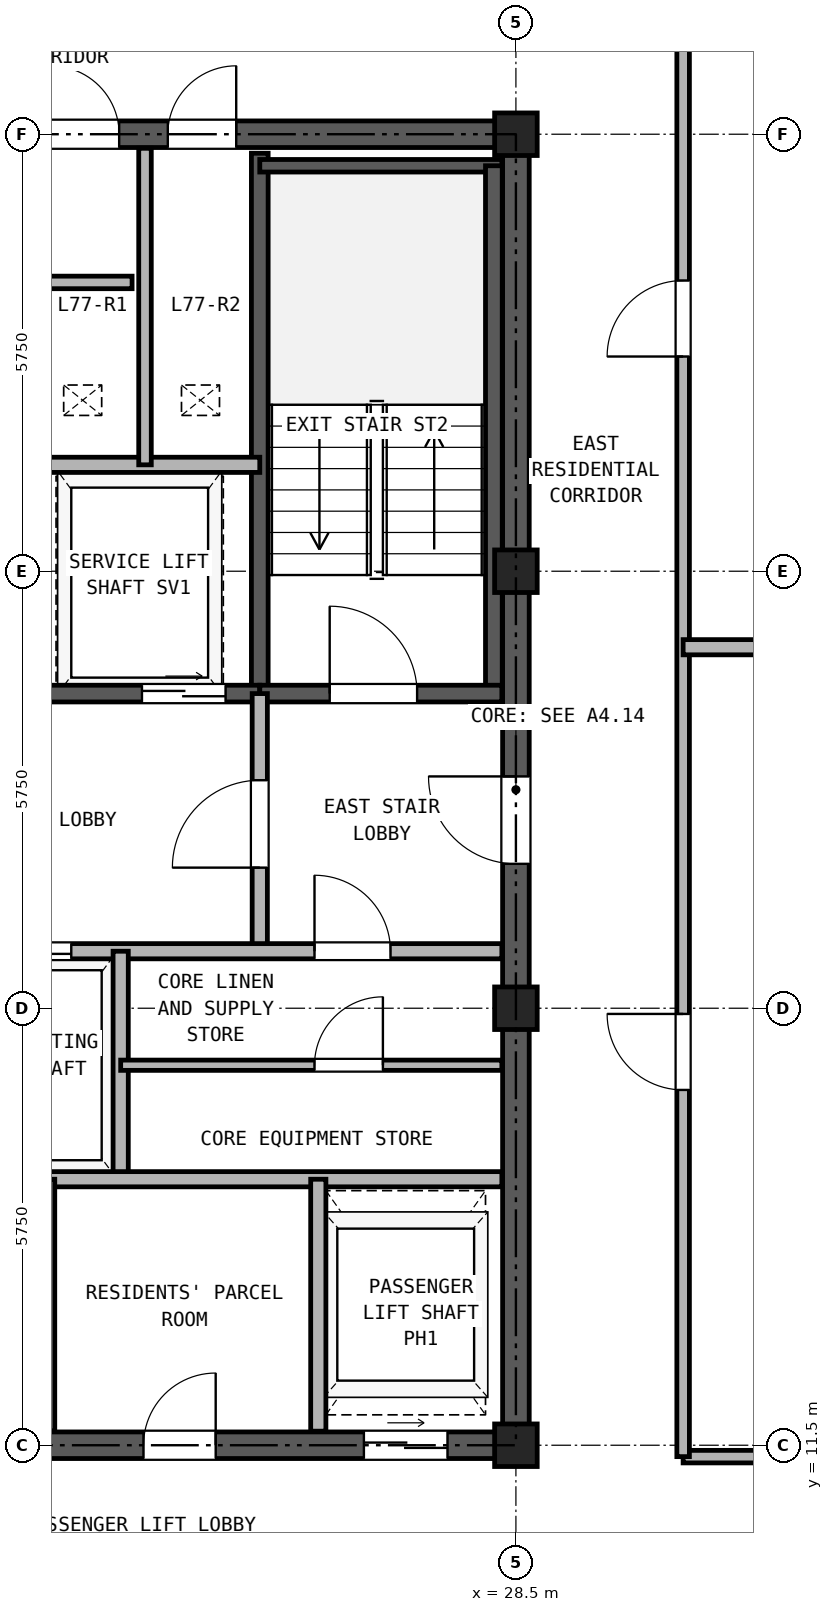
"""IFC4 building model, lengths in metres.
Left out: names, types, materials, properties, quantities, classifications, styles, units other than length and angle.
Written with IfcOpenShell. Run it as: python <this file> out.ifc"""

import sys

from ifc_helpers import new_model, si_unit, direction, frame, frame_2d, origin, origin_2d, place, context, subcontext, project, spatial, rectangle, hollow_rectangle, extrude, source, transform, mapped, element, fill, save


model = new_model("IFC4")
c1 = context("Model", 3, precision=1e-05, world=origin(), true_north=direction((0.0, 1.0)))
c2 = subcontext(c1, "Body", "Model", "MODEL_VIEW")
j1 = project(units=[si_unit("LENGTHUNIT", "METRE"), si_unit("PLANEANGLEUNIT", "RADIAN")], contexts=[c1])
p1 = place(None, origin())
s1 = spatial("IfcSite", under=j1, at=p1, CompositionType="ELEMENT")
p2 = place(p1, origin())
s2 = spatial("IfcBuilding", under=s1, at=p2, CompositionType="ELEMENT")
p3 = place(p2, frame((0.0, 0.0, 268.1)))
s3 = spatial("IfcBuildingStorey", under=s2, at=p3, CompositionType="ELEMENT", Elevation=268.1)
m1 = source(origin(), c2, "Body", "SweptSolid", [
    extrude(hollow_rectangle(XDim=0.56, YDim=0.56, WallThickness=0.03, at=origin_2d()), origin(), (0.0, 0.0, 1.0), 2.98),
])
for number, where, z_axis, x_axis in (
    (1, (28.5, 11.5, 0.0), (0.0, 0.0, 1.0), (1.0, 0.0, 0.0)),
    (2, (28.5, 17.25, 0.0), (0.0, 0.0, 1.0), (1.0, 0.0, 0.0)),
    (3, (28.5, 23.0, 0.0), (0.0, 0.0, 1.0), (1.0, 0.0, 0.0)),
    (4, (28.5, 28.75, 0.0), (0.0, 0.0, 1.0), (1.0, 0.0, 0.0)),
):
    element("IfcColumn", number, at=place(p3, frame(where, z_axis=z_axis, x_axis=x_axis)), inside=s3, PredefinedType="COLUMN", context=c2, shape_type="MappedRepresentation", body=[
        mapped(m1, transform((0.0, 0.0, 0.0), x_axis=(1.0, 0.0, 0.0), y_axis=(0.0, 1.0, 0.0), z_axis=(0.0, 0.0, 1.0), scale=1.0)),
    ])
p4 = place(p3, frame((18.325, 11.5, 0.0), z_axis=(0.0, 0.0, 1.0), x_axis=(1.0, 0.0, 0.0)))
e5 = element("IfcWall", 5, at=p4, inside=s3, PredefinedType="SHEAR", context=c2, shape_type="SweptSolid", body=[
    extrude(rectangle(XDim=10.35, YDim=0.35, at=frame_2d((5.175, 0.0))), origin(), (0.0, 0.0, 1.0), 2.98),
])
p5 = place(p4, frame((1.775, 0.0, 0.0)))
e6 = element("IfcOpeningElement", 6, at=p5, cuts=e5, PredefinedType="OPENING", context=c2, shape_type="SweptSolid", body=[
    extrude(rectangle(XDim=0.95, YDim=2.15, at=frame_2d((0.475, 1.075))), frame((0.0, 0.185, 0.0), z_axis=(0.0, -1.0, 0.0), x_axis=(1.0, 0.0, 0.0)), (0.0, 0.0, 1.0), 0.37),
])
p6 = place(p4, frame((5.275, 0.0, 0.0)))
e7 = element("IfcOpeningElement", 7, at=p6, cuts=e5, PredefinedType="OPENING", context=c2, shape_type="SweptSolid", body=[
    extrude(rectangle(XDim=0.95, YDim=2.15, at=frame_2d((0.475, 1.075))), frame((0.0, 0.185, 0.0), z_axis=(0.0, -1.0, 0.0), x_axis=(1.0, 0.0, 0.0)), (0.0, 0.0, 1.0), 0.37),
])
p7 = place(p4, frame((8.175, 0.0, 0.0)))
e8 = element("IfcOpeningElement", 8, at=p7, cuts=e5, PredefinedType="OPENING", context=c2, shape_type="SweptSolid", body=[
    extrude(rectangle(XDim=1.1, YDim=2.25, at=frame_2d((0.55, 1.125))), frame((0.0, 0.185, 0.0), z_axis=(0.0, -1.0, 0.0), x_axis=(1.0, 0.0, 0.0)), (0.0, 0.0, 1.0), 0.37),
])
p8 = place(p3, frame((18.325, 28.75, 0.0), z_axis=(0.0, 0.0, 1.0), x_axis=(1.0, 0.0, 0.0)))
e9 = element("IfcWall", 9, at=p8, inside=s3, PredefinedType="SHEAR", context=c2, shape_type="SweptSolid", body=[
    extrude(rectangle(XDim=10.35, YDim=0.35, at=frame_2d((5.175, 0.0))), origin(), (0.0, 0.0, 1.0), 2.98),
])
p9 = place(p8, frame((4.055, 0.0, 0.0)))
e10 = element("IfcOpeningElement", 10, at=p9, cuts=e9, PredefinedType="OPENING", context=c2, shape_type="SweptSolid", body=[
    extrude(rectangle(XDim=0.9, YDim=2.05, at=frame_2d((0.45, 1.025))), frame((0.0, 0.185, 0.0), z_axis=(0.0, -1.0, 0.0), x_axis=(1.0, 0.0, 0.0)), (0.0, 0.0, 1.0), 0.37),
])
p10 = place(p8, frame((5.595, 0.0, 0.0)))
e11 = element("IfcOpeningElement", 11, at=p10, cuts=e9, PredefinedType="OPENING", context=c2, shape_type="SweptSolid", body=[
    extrude(rectangle(XDim=0.9, YDim=2.05, at=frame_2d((0.45, 1.025))), frame((0.0, 0.185, 0.0), z_axis=(0.0, -1.0, 0.0), x_axis=(1.0, 0.0, 0.0)), (0.0, 0.0, 1.0), 0.37),
])
p11 = place(p3, frame((28.5, 11.675, 0.0), z_axis=(0.0, 0.0, 1.0), x_axis=(0.0, 1.0, 0.0)))
e12 = element("IfcWall", 12, at=p11, inside=s3, PredefinedType="SHEAR", context=c2, shape_type="SweptSolid", body=[
    extrude(rectangle(XDim=16.9, YDim=0.35, at=frame_2d((8.45, 0.0))), origin(), (0.0, 0.0, 1.0), 2.98),
])
p12 = place(p11, frame((7.475, 0.0, 0.0)))
e13 = element("IfcOpeningElement", 13, at=p12, cuts=e12, PredefinedType="OPENING", context=c2, shape_type="SweptSolid", body=[
    extrude(rectangle(XDim=1.15, YDim=2.2, at=frame_2d((0.575, 1.1))), frame((0.0, 0.185, 0.0), z_axis=(0.0, -1.0, 0.0), x_axis=(1.0, 0.0, 0.0)), (0.0, 0.0, 1.0), 0.37),
])
p13 = place(p3, frame((25.13, 21.39, 0.0), z_axis=(0.0, 0.0, 1.0), x_axis=(0.0, 1.0, 0.0)))
e14 = element("IfcWall", 14, at=p13, inside=s3, PredefinedType="SOLIDWALL", context=c2, shape_type="SweptSolid", body=[
    extrude(rectangle(XDim=7.11, YDim=0.22, at=frame_2d((3.555, 0.0))), origin(), (0.0, 0.0, 1.0), 2.98),
])
p14 = place(p3, frame((25.13, 28.335, 0.0), z_axis=(0.0, 0.0, 1.0), x_axis=(1.0, 0.0, 0.0)))
e15 = element("IfcWall", 15, at=p14, inside=s3, PredefinedType="PARTITIONING", context=c2, shape_type="SweptSolid", body=[
    extrude(rectangle(XDim=3.185, YDim=0.165, at=frame_2d((1.593, 0.0))), origin(), (0.0, 0.0, 1.0), 2.98),
])
p15 = place(p3, frame((28.21, 21.39, 0.0), z_axis=(0.0, 0.0, 1.0), x_axis=(0.0, 1.0, 0.0)))
e16 = element("IfcWall", 16, at=p15, inside=s3, PredefinedType="SOLIDWALL", context=c2, shape_type="SweptSolid", body=[
    extrude(rectangle(XDim=6.945, YDim=0.22, at=frame_2d((3.473, 0.0))), origin(), (0.0, 0.0, 1.0), 2.98),
])
p16 = place(p3, frame((18.685, 21.39, 0.0), z_axis=(0.0, 0.0, 1.0), x_axis=(1.0, 0.0, 0.0)))
e17 = element("IfcWall", 17, at=p16, inside=s3, PredefinedType="SOLIDWALL", context=c2, shape_type="SweptSolid", body=[
    extrude(rectangle(XDim=6.445, YDim=0.22, at=frame_2d((3.222, 0.0))), origin(), (0.0, 0.0, 1.0), 2.98),
])
p17 = place(p16, frame((1.165, 0.0, 0.0)))
e18 = element("IfcOpeningElement", 18, at=p17, cuts=e17, PredefinedType="OPENING", context=c2, shape_type="SweptSolid", body=[
    extrude(rectangle(XDim=1.15, YDim=2.2, at=frame_2d((0.575, 1.1))), frame((0.0, 0.12, 0.0), z_axis=(0.0, -1.0, 0.0), x_axis=(1.0, 0.0, 0.0)), (0.0, 0.0, 1.0), 0.24),
])
p18 = place(p16, frame((4.895, 0.0, 0.0)))
e19 = element("IfcOpeningElement", 19, at=p18, cuts=e17, PredefinedType="OPENING", context=c2, shape_type="SweptSolid", body=[
    extrude(rectangle(XDim=1.1, YDim=2.25, at=frame_2d((0.55, 1.125))), frame((0.0, 0.12, 0.0), z_axis=(0.0, -1.0, 0.0), x_axis=(1.0, 0.0, 0.0)), (0.0, 0.0, 1.0), 0.24),
])
p19 = place(p3, frame((25.13, 21.39, 0.0), z_axis=(0.0, 0.0, 1.0), x_axis=(1.0, 0.0, 0.0)))
e20 = element("IfcWall", 20, at=p19, inside=s3, PredefinedType="SOLIDWALL", context=c2, shape_type="SweptSolid", body=[
    extrude(rectangle(XDim=3.185, YDim=0.22, at=frame_2d((1.593, 0.0))), origin(), (0.0, 0.0, 1.0), 2.98),
])
p20 = place(p19, frame((0.92, 0.0, 0.0)))
e21 = element("IfcOpeningElement", 21, at=p20, cuts=e20, PredefinedType="OPENING", context=c2, shape_type="SweptSolid", body=[
    extrude(rectangle(XDim=1.15, YDim=2.2, at=frame_2d((0.575, 1.1))), frame((0.0, 0.12, 0.0), z_axis=(0.0, -1.0, 0.0), x_axis=(1.0, 0.0, 0.0)), (0.0, 0.0, 1.0), 0.24),
])
p21 = place(p3, frame((22.11, 24.4, 0.0), z_axis=(0.0, 0.0, 1.0), x_axis=(1.0, 0.0, 0.0)))
e22 = element("IfcWall", 22, at=p21, inside=s3, PredefinedType="PARTITIONING", context=c2, shape_type="SweptSolid", body=[
    extrude(rectangle(XDim=3.02, YDim=0.2, at=frame_2d((1.51, 0.0))), origin(), (0.0, 0.0, 1.0), 2.98),
])
p22 = place(p3, frame((23.62, 24.4, 0.0), z_axis=(0.0, 0.0, 1.0), x_axis=(0.0, 1.0, 0.0)))
e23 = element("IfcWall", 23, at=p22, inside=s3, PredefinedType="PARTITIONING", context=c2, shape_type="SweptSolid", body=[
    extrude(rectangle(XDim=4.165, YDim=0.165, at=frame_2d((2.083, 0.0))), origin(), (0.0, 0.0, 1.0), 2.98),
])
p23 = place(p3, frame((25.13, 18.0, 0.0), z_axis=(0.0, 0.0, 1.0), x_axis=(0.0, 1.0, 0.0)))
e24 = element("IfcWall", 24, at=p23, inside=s3, PredefinedType="PARTITIONING", context=c2, shape_type="SweptSolid", body=[
    extrude(rectangle(XDim=3.39, YDim=0.2, at=frame_2d((1.695, 0.0))), origin(), (0.0, 0.0, 1.0), 2.98),
])
p24 = place(p23, frame((1.1, 0.0, 0.0)))
e25 = element("IfcOpeningElement", 25, at=p24, cuts=e24, PredefinedType="OPENING", context=c2, shape_type="SweptSolid", body=[
    extrude(rectangle(XDim=1.15, YDim=2.2, at=frame_2d((0.575, 1.1))), frame((0.0, 0.11, 0.0), z_axis=(0.0, -1.0, 0.0), x_axis=(1.0, 0.0, 0.0)), (0.0, 0.0, 1.0), 0.22),
])
p25 = place(p3, frame((18.685, 18.0, 0.0), z_axis=(0.0, 0.0, 1.0), x_axis=(1.0, 0.0, 0.0)))
e26 = element("IfcWall", 26, at=p25, inside=s3, PredefinedType="PARTITIONING", context=c2, shape_type="SweptSolid", body=[
    extrude(rectangle(XDim=9.63, YDim=0.2, at=frame_2d((4.815, 0.0))), origin(), (0.0, 0.0, 1.0), 2.98),
])
p26 = place(p25, frame((0.565, 0.0, 0.0)))
e27 = element("IfcOpeningElement", 27, at=p26, cuts=e26, PredefinedType="OPENING", context=c2, shape_type="SweptSolid", body=[
    extrude(rectangle(XDim=1.3, YDim=2.3, at=frame_2d((0.65, 1.15))), frame((0.0, 0.11, 0.0), z_axis=(0.0, -1.0, 0.0), x_axis=(1.0, 0.0, 0.0)), (0.0, 0.0, 1.0), 0.22),
])
p27 = place(p25, frame((2.665, 0.0, 0.0)))
e28 = element("IfcOpeningElement", 28, at=p27, cuts=e26, PredefinedType="OPENING", context=c2, shape_type="SweptSolid", body=[
    extrude(rectangle(XDim=1.3, YDim=2.3, at=frame_2d((0.65, 1.15))), frame((0.0, 0.11, 0.0), z_axis=(0.0, -1.0, 0.0), x_axis=(1.0, 0.0, 0.0)), (0.0, 0.0, 1.0), 0.22),
])
p28 = place(p25, frame((7.165, 0.0, 0.0)))
e29 = element("IfcOpeningElement", 29, at=p28, cuts=e26, PredefinedType="OPENING", context=c2, shape_type="SweptSolid", body=[
    extrude(rectangle(XDim=1.0, YDim=2.15, at=frame_2d((0.5, 1.075))), frame((0.0, 0.11, 0.0), z_axis=(0.0, -1.0, 0.0), x_axis=(1.0, 0.0, 0.0)), (0.0, 0.0, 1.0), 0.22),
])
p29 = place(p3, frame((23.3, 15.0, 0.0), z_axis=(0.0, 0.0, 1.0), x_axis=(0.0, 1.0, 0.0)))
e30 = element("IfcWall", 30, at=p29, inside=s3, PredefinedType="PARTITIONING", context=c2, shape_type="SweptSolid", body=[
    extrude(rectangle(XDim=3.0, YDim=0.2, at=frame_2d((1.5, 0.0))), origin(), (0.0, 0.0, 1.0), 2.98),
])
p30 = place(p3, frame((18.685, 15.0, 0.0), z_axis=(0.0, 0.0, 1.0), x_axis=(1.0, 0.0, 0.0)))
e31 = element("IfcWall", 31, at=p30, inside=s3, PredefinedType="PARTITIONING", context=c2, shape_type="SweptSolid", body=[
    extrude(rectangle(XDim=9.63, YDim=0.2, at=frame_2d((4.815, 0.0))), origin(), (0.0, 0.0, 1.0), 2.98),
])
p31 = place(p3, frame((23.3, 16.5, 0.0), z_axis=(0.0, 0.0, 1.0), x_axis=(1.0, 0.0, 0.0)))
e32 = element("IfcWall", 32, at=p31, inside=s3, PredefinedType="PARTITIONING", context=c2, shape_type="SweptSolid", body=[
    extrude(rectangle(XDim=5.015, YDim=0.135, at=frame_2d((2.507, 0.0))), origin(), (0.0, 0.0, 1.0), 2.98),
])
p32 = place(p31, frame((2.55, 0.0, 0.0)))
e33 = element("IfcOpeningElement", 33, at=p32, cuts=e32, PredefinedType="OPENING", context=c2, shape_type="SweptSolid", body=[
    extrude(rectangle(XDim=0.9, YDim=2.05, at=frame_2d((0.45, 1.025))), frame((0.0, 0.077, 0.0), z_axis=(0.0, -1.0, 0.0), x_axis=(1.0, 0.0, 0.0)), (0.0, 0.0, 1.0), 0.155),
])
p33 = place(p3, frame((22.35, 11.685, 0.0), z_axis=(0.0, 0.0, 1.0), x_axis=(0.0, 1.0, 0.0)))
e34 = element("IfcWall", 34, at=p33, inside=s3, PredefinedType="PARTITIONING", context=c2, shape_type="SweptSolid", body=[
    extrude(rectangle(XDim=3.315, YDim=0.165, at=frame_2d((1.657, 0.0))), origin(), (0.0, 0.0, 1.0), 2.98),
])
p34 = place(p3, frame((25.9, 11.685, 0.0), z_axis=(0.0, 0.0, 1.0), x_axis=(0.0, 1.0, 0.0)))
e35 = element("IfcWall", 35, at=p34, inside=s3, PredefinedType="PARTITIONING", context=c2, shape_type="SweptSolid", body=[
    extrude(rectangle(XDim=3.315, YDim=0.2, at=frame_2d((1.657, 0.0))), origin(), (0.0, 0.0, 1.0), 2.98),
])
p35 = place(p3, frame((30.7, 11.35, 0.0), z_axis=(0.0, 0.0, 1.0), x_axis=(1.0, 0.0, 0.0)))
e36 = element("IfcWall", 36, at=p35, inside=s3, PredefinedType="PARTITIONING", context=c2, shape_type="SweptSolid", body=[
    extrude(rectangle(XDim=7.5, YDim=0.165, at=frame_2d((3.75, 0.0))), origin(), (0.0, 0.0, 1.0), 2.428),
])
p36 = place(p3, frame((30.7, 11.35, 0.0), z_axis=(0.0, 0.0, 1.0), x_axis=(0.0, 1.0, 0.0)))
e37 = element("IfcWall", 37, at=p36, inside=s3, PredefinedType="PARTITIONING", context=c2, shape_type="SweptSolid", body=[
    extrude(rectangle(XDim=23.79, YDim=0.165, at=frame_2d((11.895, 0.0))), origin(), (0.0, 0.0, 1.0), 2.98),
])
p37 = place(p36, frame((4.825, 0.0, 0.0)))
e38 = element("IfcOpeningElement", 38, at=p37, cuts=e37, PredefinedType="OPENING", context=c2, shape_type="SweptSolid", body=[
    extrude(rectangle(XDim=1.0, YDim=2.15, at=frame_2d((0.5, 1.075))), frame((0.0, 0.093, 0.0), z_axis=(0.0, -1.0, 0.0), x_axis=(1.0, 0.0, 0.0)), (0.0, 0.0, 1.0), 0.185),
])
p38 = place(p36, frame((14.475, 0.0, 0.0)))
e39 = element("IfcOpeningElement", 39, at=p38, cuts=e37, PredefinedType="OPENING", context=c2, shape_type="SweptSolid", body=[
    extrude(rectangle(XDim=1.0, YDim=2.15, at=frame_2d((0.5, 1.075))), frame((0.0, 0.093, 0.0), z_axis=(0.0, -1.0, 0.0), x_axis=(1.0, 0.0, 0.0)), (0.0, 0.0, 1.0), 0.185),
])
p39 = place(p3, frame((30.7, 22.0, 0.0), z_axis=(0.0, 0.0, 1.0), x_axis=(1.0, 0.0, 0.0)))
e40 = element("IfcWall", 40, at=p39, inside=s3, PredefinedType="PARTITIONING", context=c2, shape_type="SweptSolid", body=[
    extrude(rectangle(XDim=10.94, YDim=0.2, at=frame_2d((5.47, 0.0))), origin(), (0.0, 0.0, 1.0), 2.98),
])
p40 = place(p3, frame((22.35, 26.8, 0.0), z_axis=(0.0, 0.0, 1.0), x_axis=(1.0, 0.0, 0.0)))
e41 = element("IfcWall", 41, at=p40, inside=s3, PredefinedType="PARTITIONING", context=c2, shape_type="SweptSolid", body=[
    extrude(rectangle(XDim=1.1, YDim=0.165, at=frame_2d((0.55, 0.0))), origin(), (0.0, 0.0, 1.0), 2.98),
])
p41 = place(p20, frame((1.15, 0.0, 0.0), z_axis=(0.0, 0.0, 1.0), x_axis=(-1.0, 0.0, 0.0)))
e42 = element("IfcDoor", 42, at=p41, inside=s3, OperationType="SINGLE_SWING_LEFT", PredefinedType="DOOR", context=c2, shape_type="SweptSolid", body=[
    extrude(rectangle(XDim=1.15, YDim=2.2, at=frame_2d((0.575, 1.1))), frame((0.0, 0.025, 0.0), z_axis=(0.0, -1.0, 0.0), x_axis=(1.0, 0.0, 0.0)), (0.0, 0.0, 1.0), 0.05),
])
fill(e21, e42)
p42 = place(p18, frame((1.1, 0.0, 0.0), z_axis=(0.0, 0.0, 1.0), x_axis=(-1.0, 0.0, 0.0)))
e43 = element("IfcDoor", 43, at=p42, inside=s3, OperationType="DOUBLE_DOOR_SLIDING", PredefinedType="DOOR", context=c2, shape_type="SweptSolid", body=[
    extrude(rectangle(XDim=1.1, YDim=2.25, at=frame_2d((0.55, 1.125))), frame((0.0, 0.025, 0.0), z_axis=(0.0, -1.0, 0.0), x_axis=(1.0, 0.0, 0.0)), (0.0, 0.0, 1.0), 0.05),
])
fill(e19, e43)
p43 = place(p24, origin())
e44 = element("IfcDoor", 44, at=p43, inside=s3, OperationType="SINGLE_SWING_LEFT", PredefinedType="DOOR", context=c2, shape_type="SweptSolid", body=[
    extrude(rectangle(XDim=1.15, YDim=2.2, at=frame_2d((0.575, 1.1))), frame((0.0, 0.025, 0.0), z_axis=(0.0, -1.0, 0.0), x_axis=(1.0, 0.0, 0.0)), (0.0, 0.0, 1.0), 0.05),
])
fill(e25, e44)
p44 = place(p27, origin())
e45 = element("IfcDoor", 45, at=p44, inside=s3, OperationType="DOUBLE_DOOR_SLIDING", PredefinedType="DOOR", context=c2, shape_type="SweptSolid", body=[
    extrude(rectangle(XDim=1.3, YDim=2.3, at=frame_2d((0.65, 1.15))), frame((0.0, 0.025, 0.0), z_axis=(0.0, -1.0, 0.0), x_axis=(1.0, 0.0, 0.0)), (0.0, 0.0, 1.0), 0.05),
])
fill(e28, e45)
p45 = place(p28, frame((1.0, 0.0, 0.0), z_axis=(0.0, 0.0, 1.0), x_axis=(-1.0, 0.0, 0.0)))
e46 = element("IfcDoor", 46, at=p45, inside=s3, OperationType="SINGLE_SWING_LEFT", PredefinedType="DOOR", context=c2, shape_type="SweptSolid", body=[
    extrude(rectangle(XDim=1.0, YDim=2.15, at=frame_2d((0.5, 1.075))), frame((0.0, 0.025, 0.0), z_axis=(0.0, -1.0, 0.0), x_axis=(1.0, 0.0, 0.0)), (0.0, 0.0, 1.0), 0.05),
])
fill(e29, e46)
p46 = place(p32, frame((0.9, 0.0, 0.0), z_axis=(0.0, 0.0, 1.0), x_axis=(-1.0, 0.0, 0.0)))
e47 = element("IfcDoor", 47, at=p46, inside=s3, OperationType="SINGLE_SWING_RIGHT", PredefinedType="DOOR", context=c2, shape_type="SweptSolid", body=[
    extrude(rectangle(XDim=0.9, YDim=2.05, at=frame_2d((0.45, 1.025))), frame((0.0, 0.025, 0.0), z_axis=(0.0, -1.0, 0.0), x_axis=(1.0, 0.0, 0.0)), (0.0, 0.0, 1.0), 0.05),
])
fill(e33, e47)
p47 = place(p12, origin())
e48 = element("IfcDoor", 48, at=p47, inside=s3, OperationType="SINGLE_SWING_RIGHT", PredefinedType="DOOR", context=c2, shape_type="SweptSolid", body=[
    extrude(rectangle(XDim=1.15, YDim=2.2, at=frame_2d((0.575, 1.1))), frame((0.0, 0.025, 0.0), z_axis=(0.0, -1.0, 0.0), x_axis=(1.0, 0.0, 0.0)), (0.0, 0.0, 1.0), 0.05),
])
fill(e13, e48)
p48 = place(p9, origin())
e49 = element("IfcDoor", 49, at=p48, inside=s3, OperationType="SINGLE_SWING_LEFT", PredefinedType="DOOR", context=c2, shape_type="SweptSolid", body=[
    extrude(rectangle(XDim=0.9, YDim=2.05, at=frame_2d((0.45, 1.025))), frame((0.0, 0.025, 0.0), z_axis=(0.0, -1.0, 0.0), x_axis=(1.0, 0.0, 0.0)), (0.0, 0.0, 1.0), 0.05),
])
fill(e10, e49)
p49 = place(p10, origin())
e50 = element("IfcDoor", 50, at=p49, inside=s3, OperationType="SINGLE_SWING_RIGHT", PredefinedType="DOOR", context=c2, shape_type="SweptSolid", body=[
    extrude(rectangle(XDim=0.9, YDim=2.05, at=frame_2d((0.45, 1.025))), frame((0.0, 0.025, 0.0), z_axis=(0.0, -1.0, 0.0), x_axis=(1.0, 0.0, 0.0)), (0.0, 0.0, 1.0), 0.05),
])
fill(e11, e50)
p50 = place(p6, frame((0.95, 0.0, 0.0), z_axis=(0.0, 0.0, 1.0), x_axis=(-1.0, 0.0, 0.0)))
e51 = element("IfcDoor", 51, at=p50, inside=s3, OperationType="SINGLE_SWING_RIGHT", PredefinedType="DOOR", context=c2, shape_type="SweptSolid", body=[
    extrude(rectangle(XDim=0.95, YDim=2.15, at=frame_2d((0.475, 1.075))), frame((0.0, 0.025, 0.0), z_axis=(0.0, -1.0, 0.0), x_axis=(1.0, 0.0, 0.0)), (0.0, 0.0, 1.0), 0.05),
])
fill(e7, e51)
p51 = place(p7, frame((1.1, 0.0, 0.0), z_axis=(0.0, 0.0, 1.0), x_axis=(-1.0, 0.0, 0.0)))
e52 = element("IfcDoor", 52, at=p51, inside=s3, OperationType="DOUBLE_DOOR_SLIDING", PredefinedType="DOOR", context=c2, shape_type="SweptSolid", body=[
    extrude(rectangle(XDim=1.1, YDim=2.25, at=frame_2d((0.55, 1.125))), frame((0.0, 0.025, 0.0), z_axis=(0.0, -1.0, 0.0), x_axis=(1.0, 0.0, 0.0)), (0.0, 0.0, 1.0), 0.05),
])
fill(e8, e52)
p52 = place(p37, frame((1.0, 0.0, 0.0), z_axis=(0.0, 0.0, 1.0), x_axis=(-1.0, 0.0, 0.0)))
e53 = element("IfcDoor", 53, at=p52, inside=s3, OperationType="SINGLE_SWING_RIGHT", PredefinedType="DOOR", context=c2, shape_type="SweptSolid", body=[
    extrude(rectangle(XDim=1.0, YDim=2.15, at=frame_2d((0.5, 1.075))), frame((0.0, 0.025, 0.0), z_axis=(0.0, -1.0, 0.0), x_axis=(1.0, 0.0, 0.0)), (0.0, 0.0, 1.0), 0.05),
])
fill(e38, e53)
p53 = place(p38, frame((1.0, 0.0, 0.0), z_axis=(0.0, 0.0, 1.0), x_axis=(-1.0, 0.0, 0.0)))
e54 = element("IfcDoor", 54, at=p53, inside=s3, OperationType="SINGLE_SWING_LEFT", PredefinedType="DOOR", context=c2, shape_type="SweptSolid", body=[
    extrude(rectangle(XDim=1.0, YDim=2.15, at=frame_2d((0.5, 1.075))), frame((0.0, 0.025, 0.0), z_axis=(0.0, -1.0, 0.0), x_axis=(1.0, 0.0, 0.0)), (0.0, 0.0, 1.0), 0.05),
])
fill(e39, e54)
save(model, sys.argv[1])
